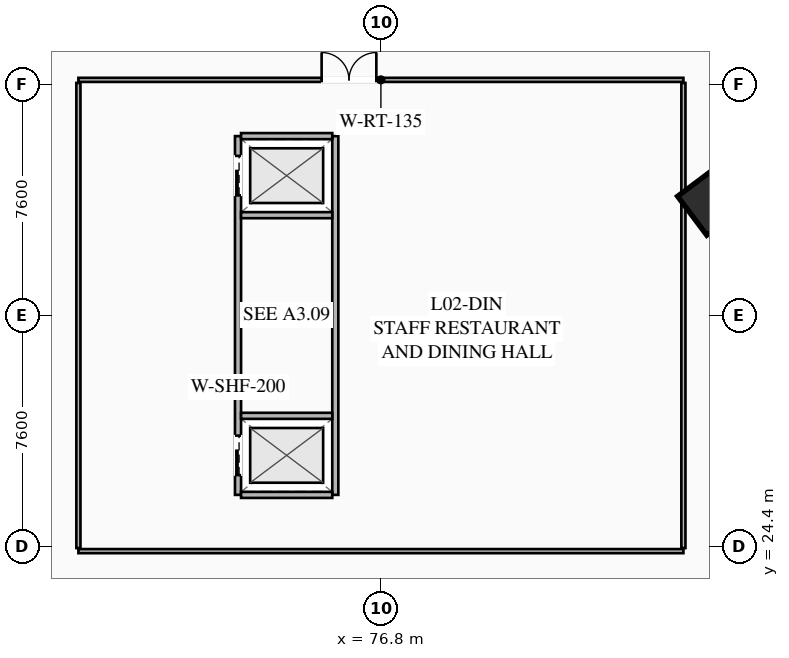
"""IFC4 building model, lengths in metres.
Left out: names, types, materials, properties, quantities, classifications, styles, units other than length and angle.
Written with IfcOpenShell. Run it as: python <this file> out.ifc"""

import sys

from ifc_helpers import new_model, si_unit, direction, frame, frame_2d, origin, origin_2d, place, context, subcontext, project, spatial, rectangle, hollow_rectangle, extrude, element, fill, save


model = new_model("IFC4")
c1 = context("Model", 3, precision=1e-05, world=origin(), true_north=direction((0.0, 1.0)))
c2 = subcontext(c1, "Body", "Model", "MODEL_VIEW")
j1 = project(units=[si_unit("LENGTHUNIT", "METRE"), si_unit("PLANEANGLEUNIT", "RADIAN")], contexts=[c1])
p1 = place(None, origin())
s1 = spatial("IfcSite", under=j1, at=p1, CompositionType="ELEMENT")
p2 = place(p1, origin())
s2 = spatial("IfcBuilding", under=s1, at=p2, CompositionType="ELEMENT")
p3 = place(p2, frame((0.0, 0.0, 10.2)))
s3 = spatial("IfcBuildingStorey", under=s2, at=p3, CompositionType="ELEMENT", Elevation=10.2)
p4 = place(p3, frame((87.68, 35.76, 0.0), z_axis=(0.0, 0.0, 1.0), x_axis=(0.799999996291, 0.600000004945, 0.0)))
e1 = element("IfcColumn", 1, at=p4, inside=s3, PredefinedType="COLUMN", context=c2, shape_type="SweptSolid", body=[
    extrude(hollow_rectangle(XDim=1.6, YDim=1.6, WallThickness=0.06, at=origin_2d()), origin(), (0.0, 0.0, 1.0), 5.14),
])
p5 = place(p3, frame((72.1, 26.1, 0.0), z_axis=(0.0, 0.0, 1.0), x_axis=(0.0, 1.0, 0.0)))
e2 = element("IfcWall", 2, at=p5, inside=s3, PredefinedType="SOLIDWALL", context=c2, shape_type="SweptSolid", body=[
    extrude(rectangle(XDim=11.8, YDim=0.2, at=frame_2d((5.9, 0.0))), origin(), (0.0, 0.0, 1.0), 2.71),
])
p6 = place(p5, frame((0.65, 0.0, 0.0)))
e3 = element("IfcOpeningElement", 3, at=p6, cuts=e2, PredefinedType="OPENING", context=c2, shape_type="SweptSolid", body=[
    extrude(rectangle(XDim=1.3, YDim=2.25, at=frame_2d((0.65, 1.125))), frame((0.0, 0.11, 0.0), z_axis=(0.0, -1.0, 0.0), x_axis=(1.0, 0.0, 0.0)), (0.0, 0.0, 1.0), 0.22),
])
p7 = place(p5, frame((9.85, 0.0, 0.0)))
e4 = element("IfcOpeningElement", 4, at=p7, cuts=e2, PredefinedType="OPENING", context=c2, shape_type="SweptSolid", body=[
    extrude(rectangle(XDim=1.3, YDim=2.25, at=frame_2d((0.65, 1.125))), frame((0.0, 0.11, 0.0), z_axis=(0.0, -1.0, 0.0), x_axis=(1.0, 0.0, 0.0)), (0.0, 0.0, 1.0), 0.22),
])
p8 = place(p3, frame((75.3, 26.1, 0.0), z_axis=(0.0, 0.0, 1.0), x_axis=(0.0, 1.0, 0.0)))
e5 = element("IfcWall", 5, at=p8, inside=s3, PredefinedType="SOLIDWALL", context=c2, shape_type="SweptSolid", body=[
    extrude(rectangle(XDim=11.8, YDim=0.2, at=frame_2d((5.9, 0.0))), origin(), (0.0, 0.0, 1.0), 2.71),
])
for number, where, z_axis, x_axis in (
    (6, (72.2, 26.1, 0.0), (0.0, 0.0, 1.0), (1.0, 0.0, 0.0)),
    (7, (72.2, 28.7, 0.0), (0.0, 0.0, 1.0), (1.0, 0.0, 0.0)),
    (8, (72.2, 35.3, 0.0), (0.0, 0.0, 1.0), (1.0, 0.0, 0.0)),
    (9, (72.2, 37.9, 0.0), (0.0, 0.0, 1.0), (1.0, 0.0, 0.0)),
):
    element("IfcWall", number, at=place(p3, frame(where, z_axis=z_axis, x_axis=x_axis)), inside=s3, PredefinedType="SOLIDWALL", context=c2, shape_type="SweptSolid", body=[
        extrude(rectangle(XDim=3.0, YDim=0.2, at=frame_2d((1.5, 0.0))), origin(), (0.0, 0.0, 1.0), 2.71),
    ])
p9 = place(p3, frame((66.85, 39.75, 0.0), z_axis=(0.0, 0.0, 1.0), x_axis=(1.0, 0.0, 0.0)))
e10 = element("IfcWall", 10, at=p9, inside=s3, PredefinedType="PARTITIONING", context=c2, shape_type="SweptSolid", body=[
    extrude(rectangle(XDim=19.9, YDim=0.135, at=frame_2d((9.95, 0.0))), origin(), (0.0, 0.0, 1.0), 2.71),
])
p10 = place(p9, frame((8.0, 0.0, 0.0)))
e11 = element("IfcOpeningElement", 11, at=p10, cuts=e10, PredefinedType="OPENING", context=c2, shape_type="SweptSolid", body=[
    extrude(rectangle(XDim=1.8, YDim=2.4, at=frame_2d((0.9, 1.2))), frame((0.0, 0.077, 0.0), z_axis=(0.0, -1.0, 0.0), x_axis=(1.0, 0.0, 0.0)), (0.0, 0.0, 1.0), 0.155),
])
p11 = place(p3, frame((66.85, 24.25, 0.0), z_axis=(0.0, 0.0, 1.0), x_axis=(1.0, 0.0, 0.0)))
e12 = element("IfcWall", 12, at=p11, inside=s3, PredefinedType="PARTITIONING", context=c2, shape_type="SweptSolid", body=[
    extrude(rectangle(XDim=19.9, YDim=0.135, at=frame_2d((9.95, 0.0))), origin(), (0.0, 0.0, 1.0), 2.71),
])
for number, where, z_axis, x_axis in (
    (13, (66.85, 24.35, 0.0), (0.0, 0.0, 1.0), (0.0, 1.0, 0.0)),
    (14, (86.75, 24.35, 0.0), (0.0, 0.0, 1.0), (0.0, 1.0, 0.0)),
):
    element("IfcWall", number, at=place(p3, frame(where, z_axis=z_axis, x_axis=x_axis)), inside=s3, PredefinedType="PARTITIONING", context=c2, shape_type="SweptSolid", body=[
        extrude(rectangle(XDim=15.3, YDim=0.135, at=frame_2d((7.65, 0.0))), origin(), (0.0, 0.0, 1.0), 2.71),
    ])
p12 = place(p10, origin())
e15 = element("IfcDoor", 15, at=p12, inside=s3, OperationType="DOUBLE_DOOR_SINGLE_SWING", PredefinedType="DOOR", context=c2, shape_type="SweptSolid", body=[
    extrude(rectangle(XDim=1.8, YDim=2.4, at=frame_2d((0.9, 1.2))), frame((0.0, 0.025, 0.0), z_axis=(0.0, -1.0, 0.0), x_axis=(1.0, 0.0, 0.0)), (0.0, 0.0, 1.0), 0.05),
])
fill(e11, e15)
p13 = place(p6, origin())
e16 = element("IfcDoor", 16, at=p13, inside=s3, OperationType="SLIDING_TO_LEFT", PredefinedType="DOOR", context=c2, shape_type="SweptSolid", body=[
    extrude(rectangle(XDim=1.3, YDim=2.25, at=frame_2d((0.65, 1.125))), frame((0.0, 0.025, 0.0), z_axis=(0.0, -1.0, 0.0), x_axis=(1.0, 0.0, 0.0)), (0.0, 0.0, 1.0), 0.05),
])
fill(e3, e16)
p14 = place(p7, origin())
e17 = element("IfcDoor", 17, at=p14, inside=s3, OperationType="SLIDING_TO_LEFT", PredefinedType="DOOR", context=c2, shape_type="SweptSolid", body=[
    extrude(rectangle(XDim=1.3, YDim=2.25, at=frame_2d((0.65, 1.125))), frame((0.0, 0.025, 0.0), z_axis=(0.0, -1.0, 0.0), x_axis=(1.0, 0.0, 0.0)), (0.0, 0.0, 1.0), 0.05),
])
fill(e4, e17)
save(model, sys.argv[1])
